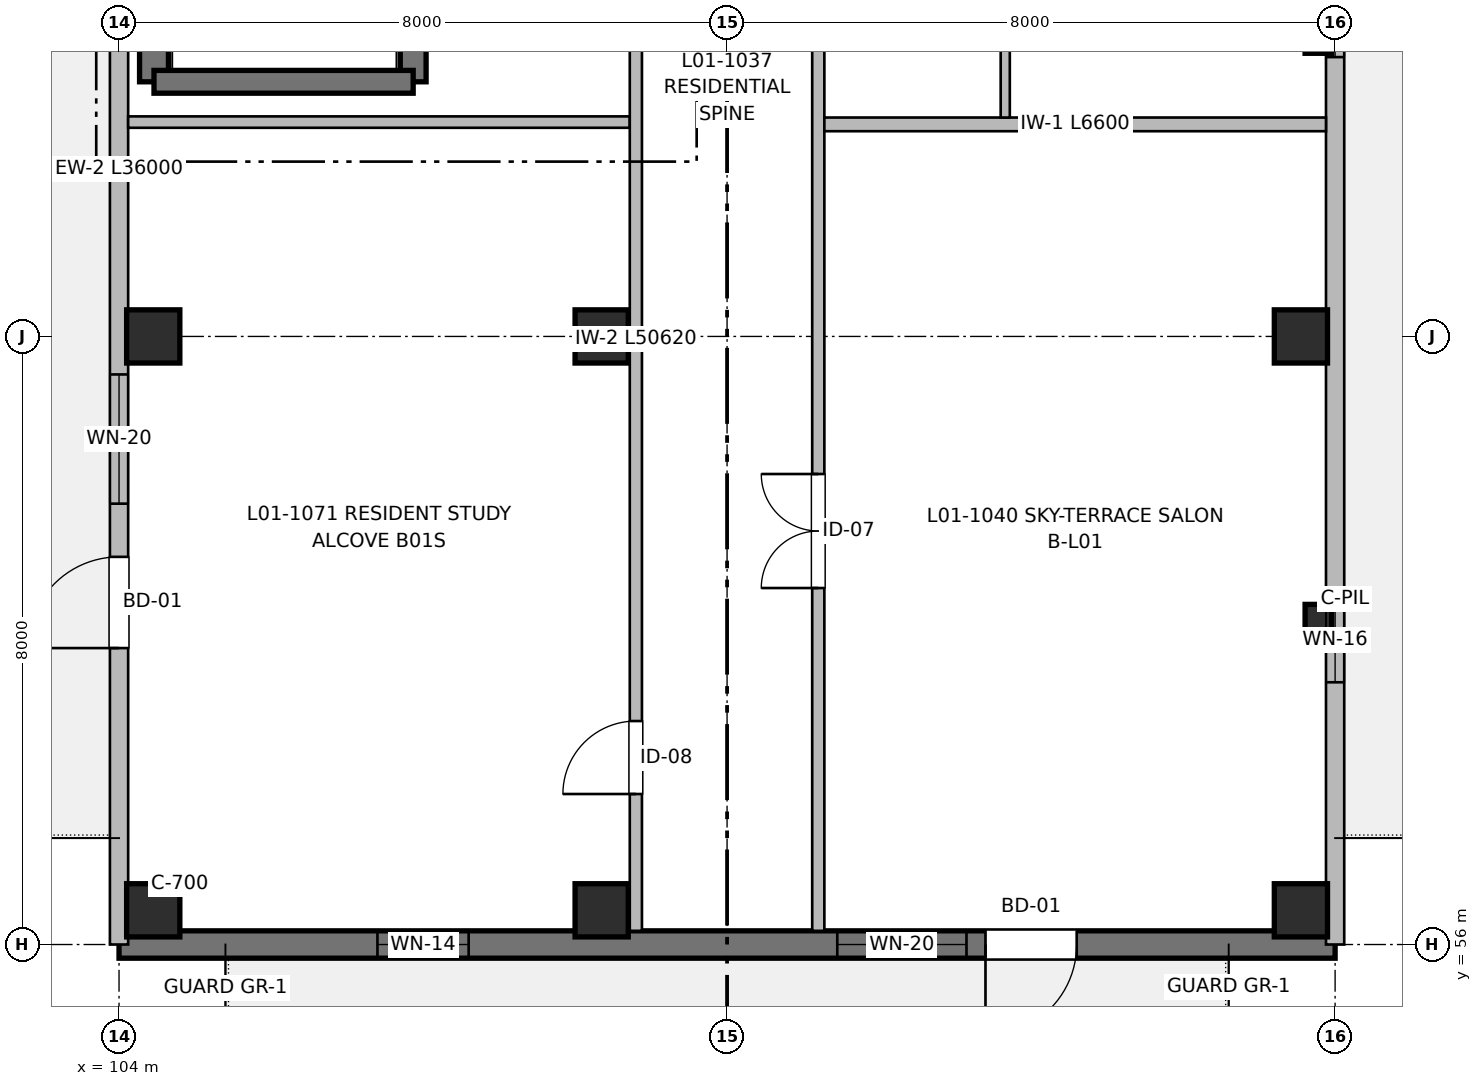
"""IFC4 building model, lengths in metres.
Left out: names, types, materials, properties, quantities, classifications, styles, units other than length and angle.
Written with IfcOpenShell. Run it as: python <this file> out.ifc"""

import sys

from ifc_helpers import new_model, si_unit, direction, frame, frame_2d, origin, origin_2d, place, context, subcontext, project, spatial, rectangle, extrude, element, fill, save


model = new_model("IFC4")
c1 = context("Model", 3, precision=1e-05, world=origin(), true_north=direction((0.0, 1.0)))
c2 = subcontext(c1, "Body", "Model", "MODEL_VIEW")
j1 = project(units=[si_unit("LENGTHUNIT", "METRE"), si_unit("PLANEANGLEUNIT", "RADIAN")], contexts=[c1])
p1 = place(None, origin())
s1 = spatial("IfcSite", under=j1, at=p1, CompositionType="ELEMENT")
p2 = place(p1, origin())
s2 = spatial("IfcBuilding", under=s1, at=p2, CompositionType="ELEMENT")
p3 = place(p2, frame((0.0, 0.0, 4.16)))
s3 = spatial("IfcBuildingStorey", under=s2, at=p3, CompositionType="ELEMENT", Elevation=4.16)
for number, where, z_axis, x_axis in (
    (1, (104.45, 56.45, 0.0), (0.0, 0.0, 1.0), (1.0, 0.0, 0.0)),
    (2, (104.45, 64.0, 0.0), (0.0, 0.0, 1.0), (1.0, 0.0, 0.0)),
    (3, (110.35, 56.45, 0.0), (0.0, 0.0, 1.0), (1.0, 0.0, 0.0)),
    (4, (110.35, 64.0, 0.0), (0.0, 0.0, 1.0), (1.0, 0.0, 0.0)),
    (5, (119.55, 56.45, 0.0), (0.0, 0.0, 1.0), (1.0, 0.0, 0.0)),
    (6, (119.55, 64.0, 0.0), (0.0, 0.0, 1.0), (1.0, 0.0, 0.0)),
):
    element("IfcColumn", number, at=place(p3, frame(where, z_axis=z_axis, x_axis=x_axis)), inside=s3, PredefinedType="COLUMN", context=c2, shape_type="SweptSolid", body=[
        extrude(rectangle(XDim=0.7, YDim=0.7, at=origin_2d()), origin(), (0.0, 0.0, 1.0), 3.2),
    ])
for number, where, z_axis, x_axis in (
    (7, (119.78, 60.2, 0.0), (0.0, 0.0, 1.0), (1.0, 0.0, 0.0)),
    (8, (119.78, 68.0, 0.0), (0.0, 0.0, 1.0), (1.0, 0.0, 0.0)),
):
    element("IfcColumn", number, at=place(p3, frame(where, z_axis=z_axis, x_axis=x_axis)), inside=s3, PredefinedType="PILASTER", context=c2, shape_type="SweptSolid", body=[
        extrude(rectangle(XDim=0.35, YDim=0.55, at=origin_2d()), origin(), (0.0, 0.0, 1.0), 3.2),
    ])
p4 = place(p3, frame((104.46, 67.35, 0.0), z_axis=(0.0, 0.0, 1.0), x_axis=(0.0, 1.0, 0.0)))
e9 = element("IfcWall", 9, at=p4, inside=s3, PredefinedType="SHEAR", context=c2, shape_type="SweptSolid", body=[
    extrude(rectangle(XDim=12.45, YDim=0.38, at=frame_2d((6.225, 0.0))), origin(), (0.0, 0.0, 1.0), 3.2),
])
p5 = place(p4, frame((2.2, 0.0, 0.97)))
e10 = element("IfcOpeningElement", 10, at=p5, cuts=e9, PredefinedType="OPENING", context=c2, shape_type="SweptSolid", body=[
    extrude(rectangle(XDim=0.95, YDim=1.25, at=frame_2d((0.475, 0.625))), frame((0.0, 0.2, 0.0), z_axis=(0.0, -1.0, 0.0), x_axis=(1.0, 0.0, 0.0)), (0.0, 0.0, 1.0), 0.4),
])
p6 = place(p3, frame((107.87, 79.8, 0.0), z_axis=(0.0, 0.0, 1.0), x_axis=(0.0, -1.0, 0.0)))
e11 = element("IfcWall", 11, at=p6, inside=s3, PredefinedType="SHEAR", context=c2, shape_type="SweptSolid", body=[
    extrude(rectangle(XDim=12.45, YDim=0.34, at=frame_2d((6.225, 0.0))), origin(), (0.0, 0.0, 1.0), 3.2),
])
p7 = place(p6, frame((10.85, 0.0, 0.0)))
e12 = element("IfcOpeningElement", 12, at=p7, cuts=e11, PredefinedType="OPENING", context=c2, shape_type="SweptSolid", body=[
    extrude(rectangle(XDim=1.05, YDim=2.15, at=frame_2d((0.525, 1.075))), frame((0.0, 0.18, 0.0), z_axis=(0.0, -1.0, 0.0), x_axis=(1.0, 0.0, 0.0)), (0.0, 0.0, 1.0), 0.36),
])
p8 = place(p3, frame((107.87, 67.35, 0.0), z_axis=(0.0, 0.0, 1.0), x_axis=(-1.0, 0.0, 0.0)))
e13 = element("IfcWall", 13, at=p8, inside=s3, PredefinedType="SHEAR", context=c2, shape_type="SweptSolid", body=[
    extrude(rectangle(XDim=3.41, YDim=0.3, at=frame_2d((1.705, 0.0))), origin(), (0.0, 0.0, 1.0), 3.2),
])
p9 = place(p3, frame((120.0, 56.0, 0.0), z_axis=(0.0, 0.0, 1.0), x_axis=(-1.0, 0.0, 0.0)))
e14 = element("IfcWall", 14, at=p9, inside=s3, PredefinedType="SHEAR", context=c2, shape_type="SweptSolid", body=[
    extrude(rectangle(XDim=16.0, YDim=0.36, at=frame_2d((8.0, 0.0))), origin(), (0.0, 0.0, 1.0), 2.98),
])
p10 = place(p9, frame((3.4, 0.0, 0.0)))
e15 = element("IfcOpeningElement", 15, at=p10, cuts=e14, PredefinedType="OPENING", context=c2, shape_type="SweptSolid", body=[
    extrude(rectangle(XDim=1.2, YDim=2.2, at=frame_2d((0.6, 1.1))), frame((0.0, 0.19, 0.0), z_axis=(0.0, -1.0, 0.0), x_axis=(1.0, 0.0, 0.0)), (0.0, 0.0, 1.0), 0.38),
])
p11 = place(p9, frame((4.85, 0.0, 0.72)))
e16 = element("IfcOpeningElement", 16, at=p11, cuts=e14, PredefinedType="OPENING", context=c2, shape_type="SweptSolid", body=[
    extrude(rectangle(XDim=1.7, YDim=1.5, at=frame_2d((0.85, 0.75))), frame((0.0, 0.19, 0.0), z_axis=(0.0, -1.0, 0.0), x_axis=(1.0, 0.0, 0.0)), (0.0, 0.0, 1.0), 0.38),
])
p12 = place(p9, frame((11.4, 0.0, 0.9)))
e17 = element("IfcOpeningElement", 17, at=p12, cuts=e14, PredefinedType="OPENING", context=c2, shape_type="SweptSolid", body=[
    extrude(rectangle(XDim=1.2, YDim=1.05, at=frame_2d((0.6, 0.525))), frame((0.0, 0.19, 0.0), z_axis=(0.0, -1.0, 0.0), x_axis=(1.0, 0.0, 0.0)), (0.0, 0.0, 1.0), 0.38),
])
p13 = place(p3, frame((120.0, 88.0, 0.0), z_axis=(0.0, 0.0, 1.0), x_axis=(0.0, -1.0, 0.0)))
e18 = element("IfcWall", 18, at=p13, inside=s3, PredefinedType="SOLIDWALL", context=c2, shape_type="SweptSolid", body=[
    extrude(rectangle(XDim=32.0, YDim=0.24, at=frame_2d((16.0, 0.0))), origin(), (0.0, 0.0, 1.0), 2.98),
])
p14 = place(p13, frame((2.0, 0.0, 0.0)))
e19 = element("IfcOpeningElement", 19, at=p14, cuts=e18, PredefinedType="OPENING", context=c2, shape_type="SweptSolid", body=[
    extrude(rectangle(XDim=1.2, YDim=2.2, at=frame_2d((0.6, 1.1))), frame((0.0, 0.13, 0.0), z_axis=(0.0, -1.0, 0.0), x_axis=(1.0, 0.0, 0.0)), (0.0, 0.0, 1.0), 0.26),
])
p15 = place(p13, frame((11.4, 0.0, 0.9)))
e20 = element("IfcOpeningElement", 20, at=p15, cuts=e18, PredefinedType="OPENING", context=c2, shape_type="SweptSolid", body=[
    extrude(rectangle(XDim=1.2, YDim=1.05, at=frame_2d((0.6, 0.525))), frame((0.0, 0.13, 0.0), z_axis=(0.0, -1.0, 0.0), x_axis=(1.0, 0.0, 0.0)), (0.0, 0.0, 1.0), 0.26),
])
p16 = place(p13, frame((19.675, 0.0, 0.9)))
e21 = element("IfcOpeningElement", 21, at=p16, cuts=e18, PredefinedType="OPENING", context=c2, shape_type="SweptSolid", body=[
    extrude(rectangle(XDim=0.65, YDim=0.95, at=frame_2d((0.325, 0.475))), frame((0.0, 0.13, 0.0), z_axis=(0.0, -1.0, 0.0), x_axis=(1.0, 0.0, 0.0)), (0.0, 0.0, 1.0), 0.26),
])
p17 = place(p13, frame((27.45, 0.0, 0.62)))
e22 = element("IfcOpeningElement", 22, at=p17, cuts=e18, PredefinedType="OPENING", context=c2, shape_type="SweptSolid", body=[
    extrude(rectangle(XDim=1.1, YDim=1.6, at=frame_2d((0.55, 0.8))), frame((0.0, 0.13, 0.0), z_axis=(0.0, -1.0, 0.0), x_axis=(1.0, 0.0, 0.0)), (0.0, 0.0, 1.0), 0.26),
])
p18 = place(p13, frame((6.299, 0.0, 0.87)))
e23 = element("IfcOpeningElement", 23, at=p18, cuts=e18, PredefinedType="OPENING", context=c2, shape_type="SweptSolid", body=[
    extrude(rectangle(XDim=1.25, YDim=1.35, at=frame_2d((0.625, 0.675))), frame((0.0, 0.13, 0.0), z_axis=(0.0, -1.0, 0.0), x_axis=(1.0, 0.0, 0.0)), (0.0, 0.0, 1.0), 0.26),
])
p19 = place(p3, frame((104.0, 56.0, 0.0), z_axis=(0.0, 0.0, 1.0), x_axis=(0.0, 1.0, 0.0)))
e24 = element("IfcWall", 24, at=p19, inside=s3, PredefinedType="SOLIDWALL", context=c2, shape_type="SweptSolid", body=[
    extrude(rectangle(XDim=36.0, YDim=0.24, at=frame_2d((18.0, 0.0))), origin(), (0.0, 0.0, 1.0), 2.98),
])
p20 = place(p19, frame((3.9, 0.0, 0.0)))
e25 = element("IfcOpeningElement", 25, at=p20, cuts=e24, PredefinedType="OPENING", context=c2, shape_type="SweptSolid", body=[
    extrude(rectangle(XDim=1.2, YDim=2.2, at=frame_2d((0.6, 1.1))), frame((0.0, 0.13, 0.0), z_axis=(0.0, -1.0, 0.0), x_axis=(1.0, 0.0, 0.0)), (0.0, 0.0, 1.0), 0.26),
])
p21 = place(p19, frame((5.8, 0.0, 0.72)))
e26 = element("IfcOpeningElement", 26, at=p21, cuts=e24, PredefinedType="OPENING", context=c2, shape_type="SweptSolid", body=[
    extrude(rectangle(XDim=1.7, YDim=1.5, at=frame_2d((0.85, 0.75))), frame((0.0, 0.13, 0.0), z_axis=(0.0, -1.0, 0.0), x_axis=(1.0, 0.0, 0.0)), (0.0, 0.0, 1.0), 0.26),
])
p22 = place(p19, frame((12.9, 0.0, 0.9)))
e27 = element("IfcOpeningElement", 27, at=p22, cuts=e24, PredefinedType="OPENING", context=c2, shape_type="SweptSolid", body=[
    extrude(rectangle(XDim=1.2, YDim=1.05, at=frame_2d((0.6, 0.525))), frame((0.0, 0.13, 0.0), z_axis=(0.0, -1.0, 0.0), x_axis=(1.0, 0.0, 0.0)), (0.0, 0.0, 1.0), 0.26),
])
p23 = place(p19, frame((22.175, 0.0, 0.9)))
e28 = element("IfcOpeningElement", 28, at=p23, cuts=e24, PredefinedType="OPENING", context=c2, shape_type="SweptSolid", body=[
    extrude(rectangle(XDim=0.65, YDim=0.95, at=frame_2d((0.325, 0.475))), frame((0.0, 0.13, 0.0), z_axis=(0.0, -1.0, 0.0), x_axis=(1.0, 0.0, 0.0)), (0.0, 0.0, 1.0), 0.26),
])
p24 = place(p19, frame((30.95, 0.0, 0.62)))
e29 = element("IfcOpeningElement", 29, at=p24, cuts=e24, PredefinedType="OPENING", context=c2, shape_type="SweptSolid", body=[
    extrude(rectangle(XDim=1.1, YDim=1.6, at=frame_2d((0.55, 0.8))), frame((0.0, 0.13, 0.0), z_axis=(0.0, -1.0, 0.0), x_axis=(1.0, 0.0, 0.0)), (0.0, 0.0, 1.0), 0.26),
])
p25 = place(p3, frame((104.12, 66.82, 0.0), z_axis=(0.0, 0.0, 1.0), x_axis=(1.0, 0.0, 0.0)))
e30 = element("IfcWall", 30, at=p25, inside=s3, PredefinedType="PARTITIONING", context=c2, shape_type="SweptSolid", body=[
    extrude(rectangle(XDim=6.6, YDim=0.15, at=frame_2d((3.3, 0.0))), origin(), (0.0, 0.0, 1.0), 2.935),
])
p26 = place(p3, frame((110.8, 56.18, 0.0), z_axis=(0.0, 0.0, 1.0), x_axis=(0.0, 1.0, 0.0)))
e31 = element("IfcWall", 31, at=p26, inside=s3, PredefinedType="PARTITIONING", context=c2, shape_type="SweptSolid", body=[
    extrude(rectangle(XDim=50.62, YDim=0.16, at=frame_2d((25.31, 0.0))), origin(), (0.0, 0.0, 1.0), 2.935),
])
p27 = place(p26, frame((12.82, 0.0, 0.0)))
e32 = element("IfcOpeningElement", 32, at=p27, cuts=e31, PredefinedType="OPENING", context=c2, shape_type="SweptSolid", body=[
    extrude(rectangle(XDim=1.1, YDim=2.15, at=frame_2d((0.55, 1.075))), frame((0.0, 0.09, 0.0), z_axis=(0.0, -1.0, 0.0), x_axis=(1.0, 0.0, 0.0)), (0.0, 0.0, 1.0), 0.18),
])
p28 = place(p26, frame((19.22, 0.0, 0.0)))
e33 = element("IfcOpeningElement", 33, at=p28, cuts=e31, PredefinedType="OPENING", context=c2, shape_type="SweptSolid", body=[
    extrude(rectangle(XDim=1.6, YDim=2.15, at=frame_2d((0.8, 1.075))), frame((0.0, 0.09, 0.0), z_axis=(0.0, -1.0, 0.0), x_axis=(1.0, 0.0, 0.0)), (0.0, 0.0, 1.0), 0.18),
])
p29 = place(p26, frame((1.8, 0.0, 0.0)))
e34 = element("IfcOpeningElement", 34, at=p29, cuts=e31, PredefinedType="OPENING", context=c2, shape_type="SweptSolid", body=[
    extrude(rectangle(XDim=0.96, YDim=2.15, at=frame_2d((0.48, 1.075))), frame((0.0, 0.09, 0.0), z_axis=(0.0, -1.0, 0.0), x_axis=(1.0, 0.0, 0.0)), (0.0, 0.0, 1.0), 0.18),
])
p30 = place(p26, frame((32.725, 0.0, 0.0)))
e35 = element("IfcOpeningElement", 35, at=p30, cuts=e31, PredefinedType="OPENING", context=c2, shape_type="SweptSolid", body=[
    extrude(rectangle(XDim=0.98, YDim=2.15, at=frame_2d((0.49, 1.075))), frame((0.0, 0.09, 0.0), z_axis=(0.0, -1.0, 0.0), x_axis=(1.0, 0.0, 0.0)), (0.0, 0.0, 1.0), 0.18),
])
p31 = place(p26, frame((40.935, 0.0, 0.0)))
e36 = element("IfcOpeningElement", 36, at=p31, cuts=e31, PredefinedType="OPENING", context=c2, shape_type="SweptSolid", body=[
    extrude(rectangle(XDim=0.98, YDim=2.15, at=frame_2d((0.49, 1.075))), frame((0.0, 0.09, 0.0), z_axis=(0.0, -1.0, 0.0), x_axis=(1.0, 0.0, 0.0)), (0.0, 0.0, 1.0), 0.18),
])
p32 = place(p3, frame((113.2, 56.18, 0.0), z_axis=(0.0, 0.0, 1.0), x_axis=(0.0, 1.0, 0.0)))
e37 = element("IfcWall", 37, at=p32, inside=s3, PredefinedType="PARTITIONING", context=c2, shape_type="SweptSolid", body=[
    extrude(rectangle(XDim=50.62, YDim=0.16, at=frame_2d((25.31, 0.0))), origin(), (0.0, 0.0, 1.0), 2.935),
])
p33 = place(p32, frame((4.51, 0.0, 0.0)))
e38 = element("IfcOpeningElement", 38, at=p33, cuts=e37, PredefinedType="OPENING", context=c2, shape_type="SweptSolid", body=[
    extrude(rectangle(XDim=1.5, YDim=2.2, at=frame_2d((0.75, 1.1))), frame((0.0, 0.09, 0.0), z_axis=(0.0, -1.0, 0.0), x_axis=(1.0, 0.0, 0.0)), (0.0, 0.0, 1.0), 0.18),
])
p34 = place(p32, frame((16.48, 0.0, 0.0)))
e39 = element("IfcOpeningElement", 39, at=p34, cuts=e37, PredefinedType="OPENING", context=c2, shape_type="SweptSolid", body=[
    extrude(rectangle(XDim=1.02, YDim=2.15, at=frame_2d((0.51, 1.075))), frame((0.0, 0.09, 0.0), z_axis=(0.0, -1.0, 0.0), x_axis=(1.0, 0.0, 0.0)), (0.0, 0.0, 1.0), 0.18),
])
p35 = place(p32, frame((28.53, 0.0, 0.0)))
e40 = element("IfcOpeningElement", 40, at=p35, cuts=e37, PredefinedType="OPENING", context=c2, shape_type="SweptSolid", body=[
    extrude(rectangle(XDim=0.98, YDim=2.15, at=frame_2d((0.49, 1.075))), frame((0.0, 0.09, 0.0), z_axis=(0.0, -1.0, 0.0), x_axis=(1.0, 0.0, 0.0)), (0.0, 0.0, 1.0), 0.18),
])
p36 = place(p32, frame((42.88, 0.0, 0.0)))
e41 = element("IfcOpeningElement", 41, at=p36, cuts=e37, PredefinedType="OPENING", context=c2, shape_type="SweptSolid", body=[
    extrude(rectangle(XDim=0.98, YDim=2.15, at=frame_2d((0.49, 1.075))), frame((0.0, 0.09, 0.0), z_axis=(0.0, -1.0, 0.0), x_axis=(1.0, 0.0, 0.0)), (0.0, 0.0, 1.0), 0.18),
])
p37 = place(p3, frame((113.28, 66.79, 0.0), z_axis=(0.0, 0.0, 1.0), x_axis=(1.0, 0.0, 0.0)))
e42 = element("IfcWall", 42, at=p37, inside=s3, PredefinedType="PARTITIONING", context=c2, shape_type="SweptSolid", body=[
    extrude(rectangle(XDim=6.6, YDim=0.18, at=frame_2d((3.3, 0.0))), origin(), (0.0, 0.0, 1.0), 2.935),
])
p38 = place(p3, frame((115.66, 66.88, 0.0), z_axis=(0.0, 0.0, 1.0), x_axis=(0.0, 1.0, 0.0)))
e43 = element("IfcWall", 43, at=p38, inside=s3, PredefinedType="PARTITIONING", context=c2, shape_type="SweptSolid", body=[
    extrude(rectangle(XDim=10.94, YDim=0.12, at=frame_2d((5.47, 0.0))), origin(), (0.0, 0.0, 1.0), 2.935),
])
p39 = place(p38, frame((1.911, 0.0, 0.0)))
e44 = element("IfcOpeningElement", 44, at=p39, cuts=e43, PredefinedType="OPENING", context=c2, shape_type="SweptSolid", body=[
    extrude(rectangle(XDim=0.94, YDim=2.1, at=frame_2d((0.47, 1.05))), frame((0.0, 0.07, 0.0), z_axis=(0.0, -1.0, 0.0), x_axis=(1.0, 0.0, 0.0)), (0.0, 0.0, 1.0), 0.14),
])
p40 = place(p38, frame((6.685, 0.0, 0.0)))
e45 = element("IfcOpeningElement", 45, at=p40, cuts=e43, PredefinedType="OPENING", context=c2, shape_type="SweptSolid", body=[
    extrude(rectangle(XDim=0.92, YDim=2.1, at=frame_2d((0.46, 1.05))), frame((0.0, 0.07, 0.0), z_axis=(0.0, -1.0, 0.0), x_axis=(1.0, 0.0, 0.0)), (0.0, 0.0, 1.0), 0.14),
])
p41 = place(p10, origin())
e46 = element("IfcDoor", 46, at=p41, inside=s3, OperationType="SINGLE_SWING_RIGHT", PredefinedType="DOOR", context=c2, shape_type="SweptSolid", body=[
    extrude(rectangle(XDim=1.2, YDim=2.2, at=frame_2d((0.6, 1.1))), frame((0.0, 0.025, 0.0), z_axis=(0.0, -1.0, 0.0), x_axis=(1.0, 0.0, 0.0)), (0.0, 0.0, 1.0), 0.05),
])
fill(e15, e46)
p42 = place(p11, origin())
e47 = element("IfcWindow", 47, at=p42, inside=s3, PartitioningType="SINGLE_PANEL", PredefinedType="WINDOW", context=c2, shape_type="SweptSolid", body=[
    extrude(rectangle(XDim=1.7, YDim=1.5, at=frame_2d((0.85, 0.75))), frame((0.0, 0.03, 0.0), z_axis=(0.0, -1.0, 0.0), x_axis=(1.0, 0.0, 0.0)), (0.0, 0.0, 1.0), 0.06),
])
fill(e16, e47)
p43 = place(p12, origin())
e48 = element("IfcWindow", 48, at=p43, inside=s3, PartitioningType="SINGLE_PANEL", PredefinedType="WINDOW", context=c2, shape_type="SweptSolid", body=[
    extrude(rectangle(XDim=1.2, YDim=1.05, at=frame_2d((0.6, 0.525))), frame((0.0, 0.03, 0.0), z_axis=(0.0, -1.0, 0.0), x_axis=(1.0, 0.0, 0.0)), (0.0, 0.0, 1.0), 0.06),
])
fill(e17, e48)
p44 = place(p16, origin())
e49 = element("IfcWindow", 49, at=p44, inside=s3, PartitioningType="SINGLE_PANEL", PredefinedType="WINDOW", context=c2, shape_type="SweptSolid", body=[
    extrude(rectangle(XDim=0.65, YDim=0.95, at=frame_2d((0.325, 0.475))), frame((0.0, 0.03, 0.0), z_axis=(0.0, -1.0, 0.0), x_axis=(1.0, 0.0, 0.0)), (0.0, 0.0, 1.0), 0.06),
])
fill(e21, e49)
p45 = place(p17, origin())
e50 = element("IfcWindow", 50, at=p45, inside=s3, PartitioningType="SINGLE_PANEL", PredefinedType="WINDOW", context=c2, shape_type="SweptSolid", body=[
    extrude(rectangle(XDim=1.1, YDim=1.6, at=frame_2d((0.55, 0.8))), frame((0.0, 0.03, 0.0), z_axis=(0.0, -1.0, 0.0), x_axis=(1.0, 0.0, 0.0)), (0.0, 0.0, 1.0), 0.06),
])
fill(e22, e50)
p46 = place(p20, origin())
e51 = element("IfcDoor", 51, at=p46, inside=s3, OperationType="SINGLE_SWING_LEFT", PredefinedType="DOOR", context=c2, shape_type="SweptSolid", body=[
    extrude(rectangle(XDim=1.2, YDim=2.2, at=frame_2d((0.6, 1.1))), frame((0.0, 0.025, 0.0), z_axis=(0.0, -1.0, 0.0), x_axis=(1.0, 0.0, 0.0)), (0.0, 0.0, 1.0), 0.05),
])
fill(e25, e51)
p47 = place(p21, origin())
e52 = element("IfcWindow", 52, at=p47, inside=s3, PartitioningType="SINGLE_PANEL", PredefinedType="WINDOW", context=c2, shape_type="SweptSolid", body=[
    extrude(rectangle(XDim=1.7, YDim=1.5, at=frame_2d((0.85, 0.75))), frame((0.0, 0.03, 0.0), z_axis=(0.0, -1.0, 0.0), x_axis=(1.0, 0.0, 0.0)), (0.0, 0.0, 1.0), 0.06),
])
fill(e26, e52)
p48 = place(p33, origin())
e53 = element("IfcDoor", 53, at=p48, inside=s3, OperationType="DOUBLE_DOOR_SINGLE_SWING", PredefinedType="DOOR", context=c2, shape_type="SweptSolid", body=[
    extrude(rectangle(XDim=1.5, YDim=2.2, at=frame_2d((0.75, 1.1))), frame((0.0, 0.025, 0.0), z_axis=(0.0, -1.0, 0.0), x_axis=(1.0, 0.0, 0.0)), (0.0, 0.0, 1.0), 0.05),
])
fill(e38, e53)
p49 = place(p29, origin())
e54 = element("IfcDoor", 54, at=p49, inside=s3, OperationType="SINGLE_SWING_LEFT", PredefinedType="DOOR", context=c2, shape_type="SweptSolid", body=[
    extrude(rectangle(XDim=0.96, YDim=2.15, at=frame_2d((0.48, 1.075))), frame((0.0, 0.025, 0.0), z_axis=(0.0, -1.0, 0.0), x_axis=(1.0, 0.0, 0.0)), (0.0, 0.0, 1.0), 0.05),
])
fill(e34, e54)
save(model, sys.argv[1])
